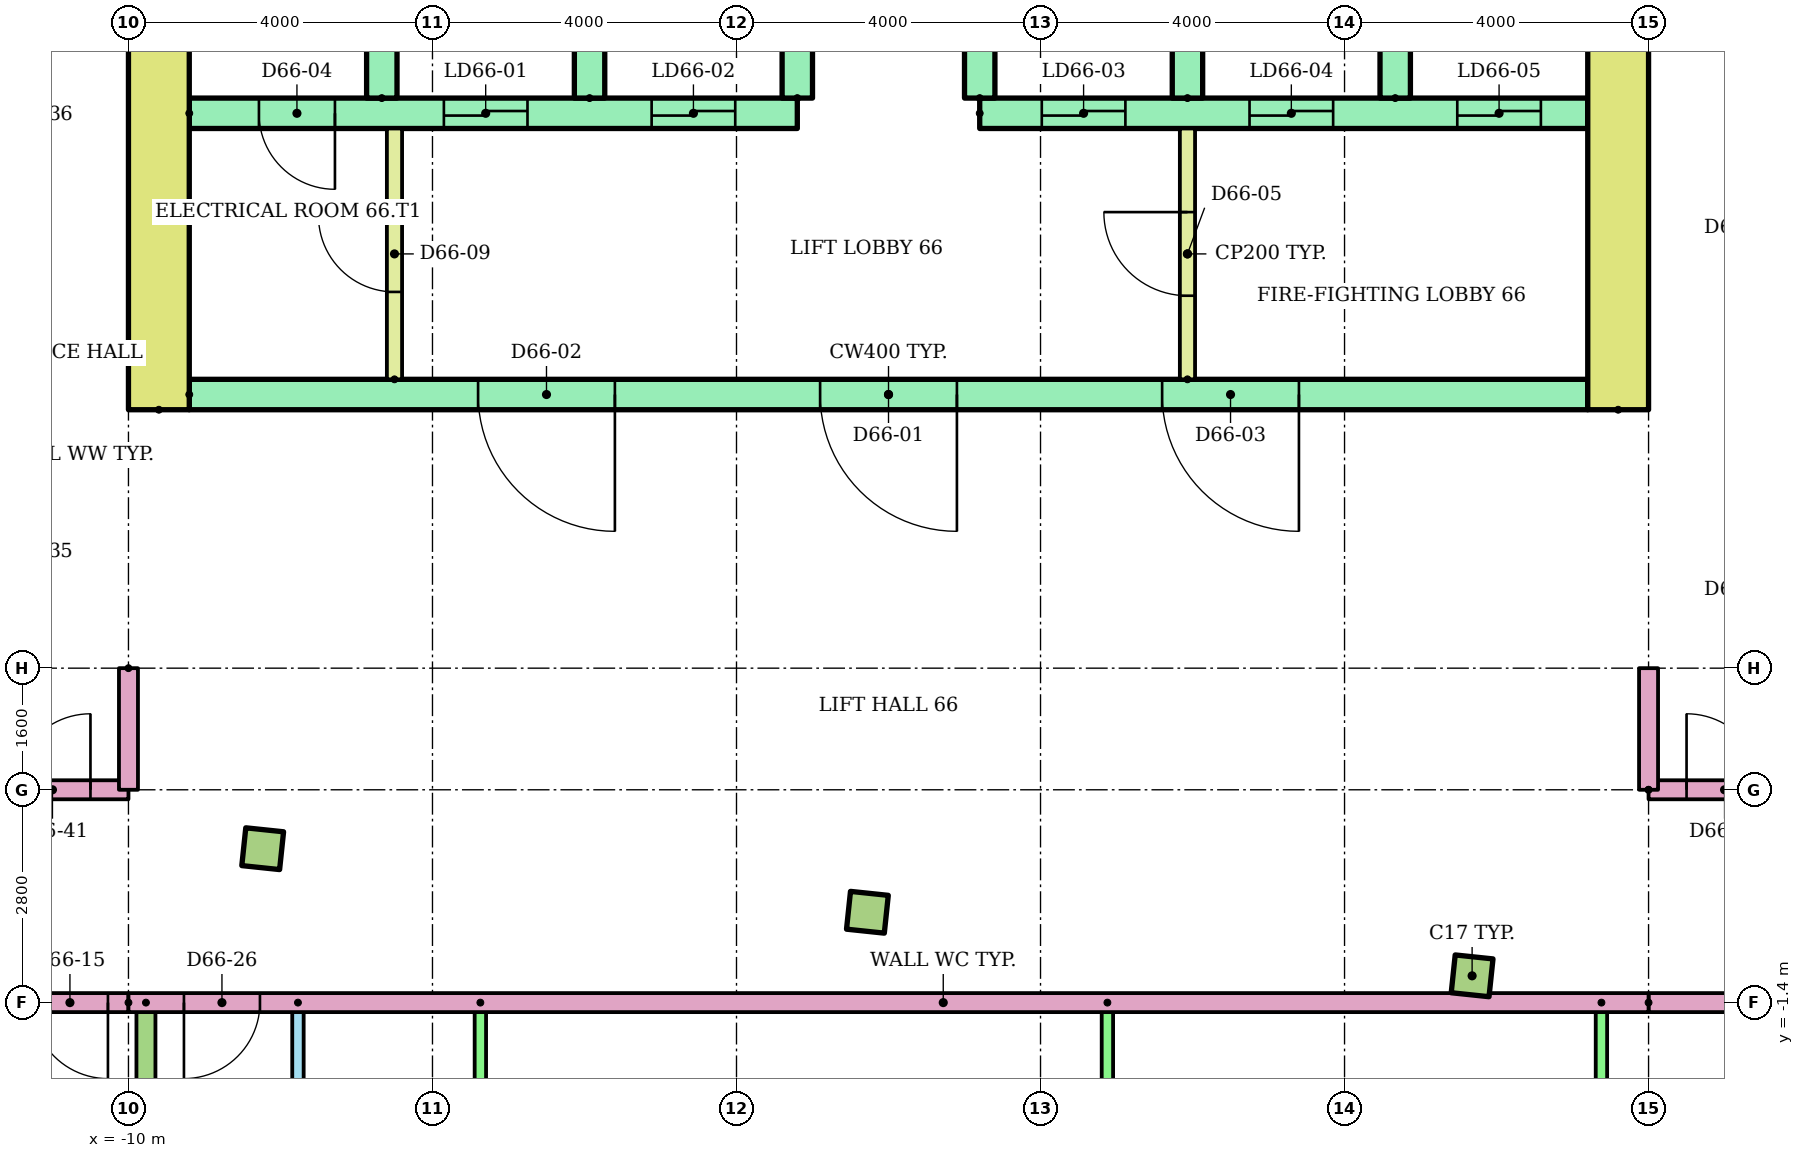
"""IFC4 building model, lengths in metres.
Left out: names, types, materials, properties, quantities, classifications, styles, units other than length and angle.
Written with IfcOpenShell. Run it as: python <this file> out.ifc"""

import sys

from ifc_helpers import new_model, si_unit, direction, frame, frame_2d, origin, origin_2d, place, context, subcontext, project, spatial, rectangle, extrude, element, fill, save


model = new_model("IFC4")
c1 = context("Model", 3, precision=1e-05, world=origin(), true_north=direction((0.0, 1.0)))
c2 = subcontext(c1, "Body", "Model", "MODEL_VIEW")
j1 = project(units=[si_unit("LENGTHUNIT", "METRE"), si_unit("PLANEANGLEUNIT", "RADIAN")], contexts=[c1])
p1 = place(None, origin())
s1 = spatial("IfcSite", under=j1, at=p1, CompositionType="ELEMENT")
p2 = place(p1, origin())
s2 = spatial("IfcBuilding", under=s1, at=p2, CompositionType="ELEMENT")
p3 = place(p2, frame((0.0, 0.0, 256.3)))
s3 = spatial("IfcBuildingStorey", under=s2, at=p3, CompositionType="ELEMENT", Elevation=256.3)
for number, where, z_axis, x_axis in (
    (1, (-8.234, 0.625, 0.0), (0.0, 0.0, 1.0), (0.995, -0.105, 0.0)),
    (2, (-0.278, -0.211, 0.0), (0.0, 0.0, 1.0), (0.995, -0.105, 0.0)),
    (3, (7.678, -1.048, 0.0), (0.0, 0.0, 1.0), (0.995, -0.105, 0.0)),
):
    element("IfcColumn", number, at=place(p3, frame(where, z_axis=z_axis, x_axis=x_axis)), inside=s3, PredefinedType="COLUMN", context=c2, shape_type="SweptSolid", body=[
        extrude(rectangle(XDim=0.5, YDim=0.5, at=origin_2d()), origin(), (0.0, 0.0, 1.0), 3.2),
    ])
for number, where, z_axis, x_axis in (
    (4, (-9.6, 6.4, 0.0), (0.0, 0.0, 1.0), (0.0, 1.0, 0.0)),
    (5, (9.6, 6.4, 0.0), (0.0, 0.0, 1.0), (0.0, 1.0, 0.0)),
):
    element("IfcWall", number, at=place(p3, frame(where, z_axis=z_axis, x_axis=x_axis)), inside=s3, PredefinedType="SHEAR", context=c2, shape_type="SweptSolid", body=[
        extrude(rectangle(XDim=13.6, YDim=0.8, at=frame_2d((6.8, 0.0))), origin(), (0.0, 0.0, 1.0), 2.92),
    ])
p4 = place(p3, frame((-9.2, 6.6, 0.0)))
e6 = element("IfcWall", 6, at=p4, inside=s3, PredefinedType="SHEAR", context=c2, shape_type="SweptSolid", body=[
    extrude(rectangle(XDim=18.4, YDim=0.4, at=frame_2d((9.2, 0.0))), origin(), (0.0, 0.0, 1.0), 2.92),
])
p5 = place(p4, frame((8.3, 0.0, 0.0)))
e7 = element("IfcOpeningElement", 7, at=p5, cuts=e6, PredefinedType="OPENING", context=c2, shape_type="SweptSolid", body=[
    extrude(rectangle(XDim=1.8, YDim=2.1, at=frame_2d((0.9, 1.05))), frame((0.0, 0.21, 0.0), z_axis=(0.0, -1.0, 0.0), x_axis=(1.0, 0.0, 0.0)), (0.0, 0.0, 1.0), 0.42),
])
p6 = place(p4, frame((3.8, 0.0, 0.0)))
e8 = element("IfcOpeningElement", 8, at=p6, cuts=e6, PredefinedType="OPENING", context=c2, shape_type="SweptSolid", body=[
    extrude(rectangle(XDim=1.8, YDim=2.1, at=frame_2d((0.9, 1.05))), frame((0.0, 0.21, 0.0), z_axis=(0.0, -1.0, 0.0), x_axis=(1.0, 0.0, 0.0)), (0.0, 0.0, 1.0), 0.42),
])
p7 = place(p4, frame((12.8, 0.0, 0.0)))
e9 = element("IfcOpeningElement", 9, at=p7, cuts=e6, PredefinedType="OPENING", context=c2, shape_type="SweptSolid", body=[
    extrude(rectangle(XDim=1.8, YDim=2.1, at=frame_2d((0.9, 1.05))), frame((0.0, 0.21, 0.0), z_axis=(0.0, -1.0, 0.0), x_axis=(1.0, 0.0, 0.0)), (0.0, 0.0, 1.0), 0.42),
])
p8 = place(p3, frame((-9.2, 10.3, 0.0)))
e10 = element("IfcWall", 10, at=p8, inside=s3, PredefinedType="SHEAR", context=c2, shape_type="SweptSolid", body=[
    extrude(rectangle(XDim=8.0, YDim=0.4, at=frame_2d((4.0, 0.0))), origin(), (0.0, 0.0, 1.0), 2.92),
])
p9 = place(p8, frame((3.35, 0.0, 0.0)))
e11 = element("IfcOpeningElement", 11, at=p9, cuts=e10, PredefinedType="OPENING", context=c2, shape_type="SweptSolid", body=[
    extrude(rectangle(XDim=1.1, YDim=2.1, at=frame_2d((0.55, 1.05))), frame((0.0, 0.21, 0.0), z_axis=(0.0, -1.0, 0.0), x_axis=(1.0, 0.0, 0.0)), (0.0, 0.0, 1.0), 0.42),
])
p10 = place(p8, frame((6.083, 0.0, 0.0)))
e12 = element("IfcOpeningElement", 12, at=p10, cuts=e10, PredefinedType="OPENING", context=c2, shape_type="SweptSolid", body=[
    extrude(rectangle(XDim=1.1, YDim=2.1, at=frame_2d((0.55, 1.05))), frame((0.0, 0.21, 0.0), z_axis=(0.0, -1.0, 0.0), x_axis=(1.0, 0.0, 0.0)), (0.0, 0.0, 1.0), 0.42),
])
p11 = place(p8, frame((0.917, 0.0, 0.0)))
e13 = element("IfcOpeningElement", 13, at=p11, cuts=e10, PredefinedType="OPENING", context=c2, shape_type="SweptSolid", body=[
    extrude(rectangle(XDim=1.0, YDim=2.1, at=frame_2d((0.5, 1.05))), frame((0.0, 0.21, 0.0), z_axis=(0.0, -1.0, 0.0), x_axis=(1.0, 0.0, 0.0)), (0.0, 0.0, 1.0), 0.42),
])
p12 = place(p3, frame((1.2, 10.3, 0.0)))
e14 = element("IfcWall", 14, at=p12, inside=s3, PredefinedType="SHEAR", context=c2, shape_type="SweptSolid", body=[
    extrude(rectangle(XDim=8.0, YDim=0.4, at=frame_2d((4.0, 0.0))), origin(), (0.0, 0.0, 1.0), 2.92),
])
p13 = place(p12, frame((0.817, 0.0, 0.0)))
e15 = element("IfcOpeningElement", 15, at=p13, cuts=e14, PredefinedType="OPENING", context=c2, shape_type="SweptSolid", body=[
    extrude(rectangle(XDim=1.1, YDim=2.1, at=frame_2d((0.55, 1.05))), frame((0.0, 0.21, 0.0), z_axis=(0.0, -1.0, 0.0), x_axis=(1.0, 0.0, 0.0)), (0.0, 0.0, 1.0), 0.42),
])
p14 = place(p12, frame((3.55, 0.0, 0.0)))
e16 = element("IfcOpeningElement", 16, at=p14, cuts=e14, PredefinedType="OPENING", context=c2, shape_type="SweptSolid", body=[
    extrude(rectangle(XDim=1.1, YDim=2.1, at=frame_2d((0.55, 1.05))), frame((0.0, 0.21, 0.0), z_axis=(0.0, -1.0, 0.0), x_axis=(1.0, 0.0, 0.0)), (0.0, 0.0, 1.0), 0.42),
])
p15 = place(p12, frame((6.283, 0.0, 0.0)))
e17 = element("IfcOpeningElement", 17, at=p15, cuts=e14, PredefinedType="OPENING", context=c2, shape_type="SweptSolid", body=[
    extrude(rectangle(XDim=1.1, YDim=2.1, at=frame_2d((0.55, 1.05))), frame((0.0, 0.21, 0.0), z_axis=(0.0, -1.0, 0.0), x_axis=(1.0, 0.0, 0.0)), (0.0, 0.0, 1.0), 0.42),
])
for number, where, z_axis, x_axis in (
    (18, (-6.667, 10.5, 0.0), (0.0, 0.0, 1.0), (0.0, 1.0, 0.0)),
    (19, (-3.933, 10.5, 0.0), (0.0, 0.0, 1.0), (0.0, 1.0, 0.0)),
    (20, (-1.2, 10.5, 0.0), (0.0, 0.0, 1.0), (0.0, 1.0, 0.0)),
    (21, (1.2, 10.5, 0.0), (0.0, 0.0, 1.0), (0.0, 1.0, 0.0)),
    (22, (3.933, 10.5, 0.0), (0.0, 0.0, 1.0), (0.0, 1.0, 0.0)),
    (23, (6.667, 10.5, 0.0), (0.0, 0.0, 1.0), (0.0, 1.0, 0.0)),
):
    element("IfcWall", number, at=place(p3, frame(where, z_axis=z_axis, x_axis=x_axis)), inside=s3, PredefinedType="SHEAR", context=c2, shape_type="SweptSolid", body=[
        extrude(rectangle(XDim=3.0, YDim=0.4, at=frame_2d((1.5, 0.0))), origin(), (0.0, 0.0, 1.0), 2.92),
    ])
p16 = place(p3, frame((3.933, 6.8, 0.0), z_axis=(0.0, 0.0, 1.0), x_axis=(0.0, 1.0, 0.0)))
e24 = element("IfcWall", 24, at=p16, inside=s3, PredefinedType="PARTITIONING", context=c2, shape_type="SweptSolid", body=[
    extrude(rectangle(XDim=3.3, YDim=0.2, at=frame_2d((1.65, 0.0))), origin(), (0.0, 0.0, 1.0), 2.92),
])
p17 = place(p16, frame((1.1, 0.0, 0.0)))
e25 = element("IfcOpeningElement", 25, at=p17, cuts=e24, PredefinedType="OPENING", context=c2, shape_type="SweptSolid", body=[
    extrude(rectangle(XDim=1.1, YDim=2.1, at=frame_2d((0.55, 1.05))), frame((0.0, 0.11, 0.0), z_axis=(0.0, -1.0, 0.0), x_axis=(1.0, 0.0, 0.0)), (0.0, 0.0, 1.0), 0.22),
])
p18 = place(p3, frame((-6.5, 6.8, 0.0), z_axis=(0.0, 0.0, 1.0), x_axis=(0.0, 1.0, 0.0)))
e26 = element("IfcWall", 26, at=p18, inside=s3, PredefinedType="PARTITIONING", context=c2, shape_type="SweptSolid", body=[
    extrude(rectangle(XDim=3.3, YDim=0.2, at=frame_2d((1.65, 0.0))), origin(), (0.0, 0.0, 1.0), 2.92),
])
p19 = place(p18, frame((1.15, 0.0, 0.0)))
e27 = element("IfcOpeningElement", 27, at=p19, cuts=e26, PredefinedType="OPENING", context=c2, shape_type="SweptSolid", body=[
    extrude(rectangle(XDim=1.0, YDim=2.1, at=frame_2d((0.5, 1.05))), frame((0.0, 0.11, 0.0), z_axis=(0.0, -1.0, 0.0), x_axis=(1.0, 0.0, 0.0)), (0.0, 0.0, 1.0), 0.22),
])
p20 = place(p3, frame((-7.77, -1.4, 0.0), z_axis=(0.0, 0.0, 1.0), x_axis=(0.0, -1.0, 0.0)))
e28 = element("IfcWall", 28, at=p20, inside=s3, PredefinedType="PARTITIONING", context=c2, shape_type="SweptSolid", body=[
    extrude(rectangle(XDim=6.075, YDim=0.15, at=frame_2d((3.037, 0.0))), origin(), (0.0, 0.0, 1.0), 2.4),
])
p21 = place(p20, frame((1.175, 0.0, 0.0)))
e29 = element("IfcOpeningElement", 29, at=p21, cuts=e28, PredefinedType="OPENING", context=c2, shape_type="SweptSolid", body=[
    extrude(rectangle(XDim=0.9, YDim=2.1, at=frame_2d((0.45, 1.05))), frame((0.0, 0.085, 0.0), z_axis=(0.0, -1.0, 0.0), x_axis=(1.0, 0.0, 0.0)), (0.0, 0.0, 1.0), 0.17),
])
p22 = place(p20, frame((4.13, 0.0, 0.0)))
e30 = element("IfcOpeningElement", 30, at=p22, cuts=e28, PredefinedType="OPENING", context=c2, shape_type="SweptSolid", body=[
    extrude(rectangle(XDim=0.8, YDim=2.1, at=frame_2d((0.4, 1.05))), frame((0.0, 0.085, 0.0), z_axis=(0.0, -1.0, 0.0), x_axis=(1.0, 0.0, 0.0)), (0.0, 0.0, 1.0), 0.17),
])
for number, where, z_axis, x_axis in (
    (31, (-5.37, -1.4, 0.0), (0.0, 0.0, 1.0), (0.0, -1.0, 0.0)),
    (32, (2.88, -1.4, 0.0), (0.0, 0.0, 1.0), (0.0, -1.0, 0.0)),
    (33, (9.38, -1.4, 0.0), (0.0, 0.0, 1.0), (0.0, -1.0, 0.0)),
):
    element("IfcWall", number, at=place(p3, frame(where, z_axis=z_axis, x_axis=x_axis)), inside=s3, PredefinedType="PARTITIONING", context=c2, shape_type="SweptSolid", body=[
        extrude(rectangle(XDim=6.075, YDim=0.15, at=frame_2d((3.037, 0.0))), origin(), (0.0, 0.0, 1.0), 2.4),
    ])
p23 = place(p3, frame((-9.77, -1.4, 0.0), z_axis=(0.0, 0.0, 1.0), x_axis=(0.0, -1.0, 0.0)))
e34 = element("IfcWall", 34, at=p23, inside=s3, PredefinedType="PARTITIONING", context=c2, shape_type="SweptSolid", body=[
    extrude(rectangle(XDim=12.504, YDim=0.25, at=frame_2d((6.252, 0.0))), origin(), (0.0, 0.0, 1.0), 2.4),
])
p24 = place(p3, frame((-10.0, -1.4, 0.0), z_axis=(0.0, 0.0, 1.0), x_axis=(-1.0, 0.0, 0.0)))
e35 = element("IfcWall", 35, at=p24, inside=s3, PredefinedType="PARTITIONING", context=c2, shape_type="SweptSolid", body=[
    extrude(rectangle(XDim=13.56, YDim=0.25, at=frame_2d((6.78, 0.0))), origin(), (0.0, 0.0, 1.0), 2.4),
])
p25 = place(p24, frame((0.27, 0.0, 0.0)))
e36 = element("IfcOpeningElement", 36, at=p25, cuts=e35, PredefinedType="OPENING", context=c2, shape_type="SweptSolid", body=[
    extrude(rectangle(XDim=1.0, YDim=2.1, at=frame_2d((0.5, 1.05))), frame((0.0, 0.135, 0.0), z_axis=(0.0, -1.0, 0.0), x_axis=(1.0, 0.0, 0.0)), (0.0, 0.0, 1.0), 0.27),
])
p26 = place(p3, frame((25.0, -1.4, 0.0), z_axis=(0.0, 0.0, 1.0), x_axis=(-1.0, 0.0, 0.0)))
e37 = element("IfcWall", 37, at=p26, inside=s3, PredefinedType="PARTITIONING", context=c2, shape_type="SweptSolid", body=[
    extrude(rectangle(XDim=15.0, YDim=0.25, at=frame_2d((7.5, 0.0))), origin(), (0.0, 0.0, 1.0), 2.4),
])
p27 = place(p26, frame((9.658, 0.0, 0.0)))
e38 = element("IfcOpeningElement", 38, at=p27, cuts=e37, PredefinedType="OPENING", context=c2, shape_type="SweptSolid", body=[
    extrude(rectangle(XDim=0.9, YDim=2.1, at=frame_2d((0.45, 1.05))), frame((0.0, 0.135, 0.0), z_axis=(0.0, -1.0, 0.0), x_axis=(1.0, 0.0, 0.0)), (0.0, 0.0, 1.0), 0.27),
])
p28 = place(p3, frame((-23.265, 1.4, 0.0)))
e39 = element("IfcWall", 39, at=p28, inside=s3, PredefinedType="PARTITIONING", context=c2, shape_type="SweptSolid", body=[
    extrude(rectangle(XDim=13.265, YDim=0.25, at=frame_2d((6.633, 0.0))), origin(), (0.0, 0.0, 1.0), 2.4),
])
p29 = place(p28, frame((11.765, 0.0, 0.0)))
e40 = element("IfcOpeningElement", 40, at=p29, cuts=e39, PredefinedType="OPENING", context=c2, shape_type="SweptSolid", body=[
    extrude(rectangle(XDim=1.0, YDim=2.1, at=frame_2d((0.5, 1.05))), frame((0.0, 0.135, 0.0), z_axis=(0.0, -1.0, 0.0), x_axis=(1.0, 0.0, 0.0)), (0.0, 0.0, 1.0), 0.27),
])
p30 = place(p3, frame((10.0, 1.4, 0.0)))
e41 = element("IfcWall", 41, at=p30, inside=s3, PredefinedType="PARTITIONING", context=c2, shape_type="SweptSolid", body=[
    extrude(rectangle(XDim=15.0, YDim=0.25, at=frame_2d((7.5, 0.0))), origin(), (0.0, 0.0, 1.0), 2.4),
])
p31 = place(p30, frame((0.5, 0.0, 0.0)))
e42 = element("IfcOpeningElement", 42, at=p31, cuts=e41, PredefinedType="OPENING", context=c2, shape_type="SweptSolid", body=[
    extrude(rectangle(XDim=1.0, YDim=2.1, at=frame_2d((0.5, 1.05))), frame((0.0, 0.135, 0.0), z_axis=(0.0, -1.0, 0.0), x_axis=(1.0, 0.0, 0.0)), (0.0, 0.0, 1.0), 0.27),
])
p32 = place(p3, frame((10.0, -1.4, 0.0), z_axis=(0.0, 0.0, 1.0), x_axis=(-1.0, 0.0, 0.0)))
e43 = element("IfcWall", 43, at=p32, inside=s3, PredefinedType="PARTITIONING", context=c2, shape_type="SweptSolid", body=[
    extrude(rectangle(XDim=20.0, YDim=0.25, at=frame_2d((10.0, 0.0))), origin(), (0.0, 0.0, 1.0), 2.4),
])
p33 = place(p32, frame((18.27, 0.0, 0.0)))
e44 = element("IfcOpeningElement", 44, at=p33, cuts=e43, PredefinedType="OPENING", context=c2, shape_type="SweptSolid", body=[
    extrude(rectangle(XDim=1.0, YDim=2.1, at=frame_2d((0.5, 1.05))), frame((0.0, 0.135, 0.0), z_axis=(0.0, -1.0, 0.0), x_axis=(1.0, 0.0, 0.0)), (0.0, 0.0, 1.0), 0.27),
])
for number, where, z_axis, x_axis in (
    (45, (-10.0, 3.0, 0.0), (0.0, 0.0, 1.0), (0.0, -1.0, 0.0)),
    (46, (10.0, 1.4, 0.0), (0.0, 0.0, 1.0), (0.0, 1.0, 0.0)),
):
    element("IfcWall", number, at=place(p3, frame(where, z_axis=z_axis, x_axis=x_axis)), inside=s3, PredefinedType="PARTITIONING", context=c2, shape_type="SweptSolid", body=[
        extrude(rectangle(XDim=1.6, YDim=0.25, at=frame_2d((0.8, 0.0))), origin(), (0.0, 0.0, 1.0), 2.4),
    ])
p34 = place(p5, frame((1.8, 0.0, 0.0), z_axis=(0.0, 0.0, 1.0), x_axis=(-1.0, 0.0, 0.0)))
e47 = element("IfcDoor", 47, at=p34, inside=s3, OperationType="DOUBLE_DOOR_SINGLE_SWING", PredefinedType="DOOR", context=c2, shape_type="SweptSolid", body=[
    extrude(rectangle(XDim=1.8, YDim=2.1, at=frame_2d((0.9, 1.05))), frame((0.0, 0.025, 0.0), z_axis=(0.0, -1.0, 0.0), x_axis=(1.0, 0.0, 0.0)), (0.0, 0.0, 1.0), 0.05),
])
fill(e7, e47)
p35 = place(p6, frame((1.8, 0.0, 0.0), z_axis=(0.0, 0.0, 1.0), x_axis=(-1.0, 0.0, 0.0)))
e48 = element("IfcDoor", 48, at=p35, inside=s3, OperationType="DOUBLE_DOOR_SINGLE_SWING", PredefinedType="DOOR", context=c2, shape_type="SweptSolid", body=[
    extrude(rectangle(XDim=1.8, YDim=2.1, at=frame_2d((0.9, 1.05))), frame((0.0, 0.025, 0.0), z_axis=(0.0, -1.0, 0.0), x_axis=(1.0, 0.0, 0.0)), (0.0, 0.0, 1.0), 0.05),
])
fill(e8, e48)
p36 = place(p7, frame((1.8, 0.0, 0.0), z_axis=(0.0, 0.0, 1.0), x_axis=(-1.0, 0.0, 0.0)))
e49 = element("IfcDoor", 49, at=p36, inside=s3, OperationType="DOUBLE_DOOR_SINGLE_SWING", PredefinedType="DOOR", context=c2, shape_type="SweptSolid", body=[
    extrude(rectangle(XDim=1.8, YDim=2.1, at=frame_2d((0.9, 1.05))), frame((0.0, 0.025, 0.0), z_axis=(0.0, -1.0, 0.0), x_axis=(1.0, 0.0, 0.0)), (0.0, 0.0, 1.0), 0.05),
])
fill(e9, e49)
p37 = place(p9, origin())
e50 = element("IfcDoor", 50, at=p37, inside=s3, OperationType="SLIDING_TO_LEFT", PredefinedType="DOOR", context=c2, shape_type="SweptSolid", body=[
    extrude(rectangle(XDim=1.1, YDim=2.1, at=frame_2d((0.55, 1.05))), frame((0.0, 0.025, 0.0), z_axis=(0.0, -1.0, 0.0), x_axis=(1.0, 0.0, 0.0)), (0.0, 0.0, 1.0), 0.05),
])
fill(e11, e50)
p38 = place(p10, origin())
e51 = element("IfcDoor", 51, at=p38, inside=s3, OperationType="SLIDING_TO_LEFT", PredefinedType="DOOR", context=c2, shape_type="SweptSolid", body=[
    extrude(rectangle(XDim=1.1, YDim=2.1, at=frame_2d((0.55, 1.05))), frame((0.0, 0.025, 0.0), z_axis=(0.0, -1.0, 0.0), x_axis=(1.0, 0.0, 0.0)), (0.0, 0.0, 1.0), 0.05),
])
fill(e12, e51)
p39 = place(p13, origin())
e52 = element("IfcDoor", 52, at=p39, inside=s3, OperationType="SLIDING_TO_LEFT", PredefinedType="DOOR", context=c2, shape_type="SweptSolid", body=[
    extrude(rectangle(XDim=1.1, YDim=2.1, at=frame_2d((0.55, 1.05))), frame((0.0, 0.025, 0.0), z_axis=(0.0, -1.0, 0.0), x_axis=(1.0, 0.0, 0.0)), (0.0, 0.0, 1.0), 0.05),
])
fill(e15, e52)
p40 = place(p14, origin())
e53 = element("IfcDoor", 53, at=p40, inside=s3, OperationType="SLIDING_TO_LEFT", PredefinedType="DOOR", context=c2, shape_type="SweptSolid", body=[
    extrude(rectangle(XDim=1.1, YDim=2.1, at=frame_2d((0.55, 1.05))), frame((0.0, 0.025, 0.0), z_axis=(0.0, -1.0, 0.0), x_axis=(1.0, 0.0, 0.0)), (0.0, 0.0, 1.0), 0.05),
])
fill(e16, e53)
p41 = place(p15, origin())
e54 = element("IfcDoor", 54, at=p41, inside=s3, OperationType="SLIDING_TO_LEFT", PredefinedType="DOOR", context=c2, shape_type="SweptSolid", body=[
    extrude(rectangle(XDim=1.1, YDim=2.1, at=frame_2d((0.55, 1.05))), frame((0.0, 0.025, 0.0), z_axis=(0.0, -1.0, 0.0), x_axis=(1.0, 0.0, 0.0)), (0.0, 0.0, 1.0), 0.05),
])
fill(e17, e54)
p42 = place(p11, frame((1.0, 0.0, 0.0), z_axis=(0.0, 0.0, 1.0), x_axis=(-1.0, 0.0, 0.0)))
e55 = element("IfcDoor", 55, at=p42, inside=s3, OperationType="SINGLE_SWING_RIGHT", PredefinedType="DOOR", context=c2, shape_type="SweptSolid", body=[
    extrude(rectangle(XDim=1.0, YDim=2.1, at=frame_2d((0.5, 1.05))), frame((0.0, 0.025, 0.0), z_axis=(0.0, -1.0, 0.0), x_axis=(1.0, 0.0, 0.0)), (0.0, 0.0, 1.0), 0.05),
])
fill(e13, e55)
p43 = place(p17, origin())
e56 = element("IfcDoor", 56, at=p43, inside=s3, OperationType="SINGLE_SWING_RIGHT", PredefinedType="DOOR", context=c2, shape_type="SweptSolid", body=[
    extrude(rectangle(XDim=1.1, YDim=2.1, at=frame_2d((0.55, 1.05))), frame((0.0, 0.025, 0.0), z_axis=(0.0, -1.0, 0.0), x_axis=(1.0, 0.0, 0.0)), (0.0, 0.0, 1.0), 0.05),
])
fill(e25, e56)
p44 = place(p19, origin())
e57 = element("IfcDoor", 57, at=p44, inside=s3, OperationType="SINGLE_SWING_RIGHT", PredefinedType="DOOR", context=c2, shape_type="SweptSolid", body=[
    extrude(rectangle(XDim=1.0, YDim=2.1, at=frame_2d((0.5, 1.05))), frame((0.0, 0.025, 0.0), z_axis=(0.0, -1.0, 0.0), x_axis=(1.0, 0.0, 0.0)), (0.0, 0.0, 1.0), 0.05),
])
fill(e27, e57)
p45 = place(p25, origin())
e58 = element("IfcDoor", 58, at=p45, inside=s3, OperationType="SINGLE_SWING_LEFT", PredefinedType="DOOR", context=c2, shape_type="SweptSolid", body=[
    extrude(rectangle(XDim=1.0, YDim=2.1, at=frame_2d((0.5, 1.05))), frame((0.0, 0.025, 0.0), z_axis=(0.0, -1.0, 0.0), x_axis=(1.0, 0.0, 0.0)), (0.0, 0.0, 1.0), 0.05),
])
fill(e36, e58)
p46 = place(p33, origin())
e59 = element("IfcDoor", 59, at=p46, inside=s3, OperationType="SINGLE_SWING_RIGHT", PredefinedType="DOOR", context=c2, shape_type="SweptSolid", body=[
    extrude(rectangle(XDim=1.0, YDim=2.1, at=frame_2d((0.5, 1.05))), frame((0.0, 0.025, 0.0), z_axis=(0.0, -1.0, 0.0), x_axis=(1.0, 0.0, 0.0)), (0.0, 0.0, 1.0), 0.05),
])
fill(e44, e59)
p47 = place(p29, origin())
e60 = element("IfcDoor", 60, at=p47, inside=s3, OperationType="SINGLE_SWING_RIGHT", PredefinedType="DOOR", context=c2, shape_type="SweptSolid", body=[
    extrude(rectangle(XDim=1.0, YDim=2.1, at=frame_2d((0.5, 1.05))), frame((0.0, 0.025, 0.0), z_axis=(0.0, -1.0, 0.0), x_axis=(1.0, 0.0, 0.0)), (0.0, 0.0, 1.0), 0.05),
])
fill(e40, e60)
p48 = place(p31, origin())
e61 = element("IfcDoor", 61, at=p48, inside=s3, OperationType="SINGLE_SWING_LEFT", PredefinedType="DOOR", context=c2, shape_type="SweptSolid", body=[
    extrude(rectangle(XDim=1.0, YDim=2.1, at=frame_2d((0.5, 1.05))), frame((0.0, 0.025, 0.0), z_axis=(0.0, -1.0, 0.0), x_axis=(1.0, 0.0, 0.0)), (0.0, 0.0, 1.0), 0.05),
])
fill(e42, e61)
save(model, sys.argv[1])
